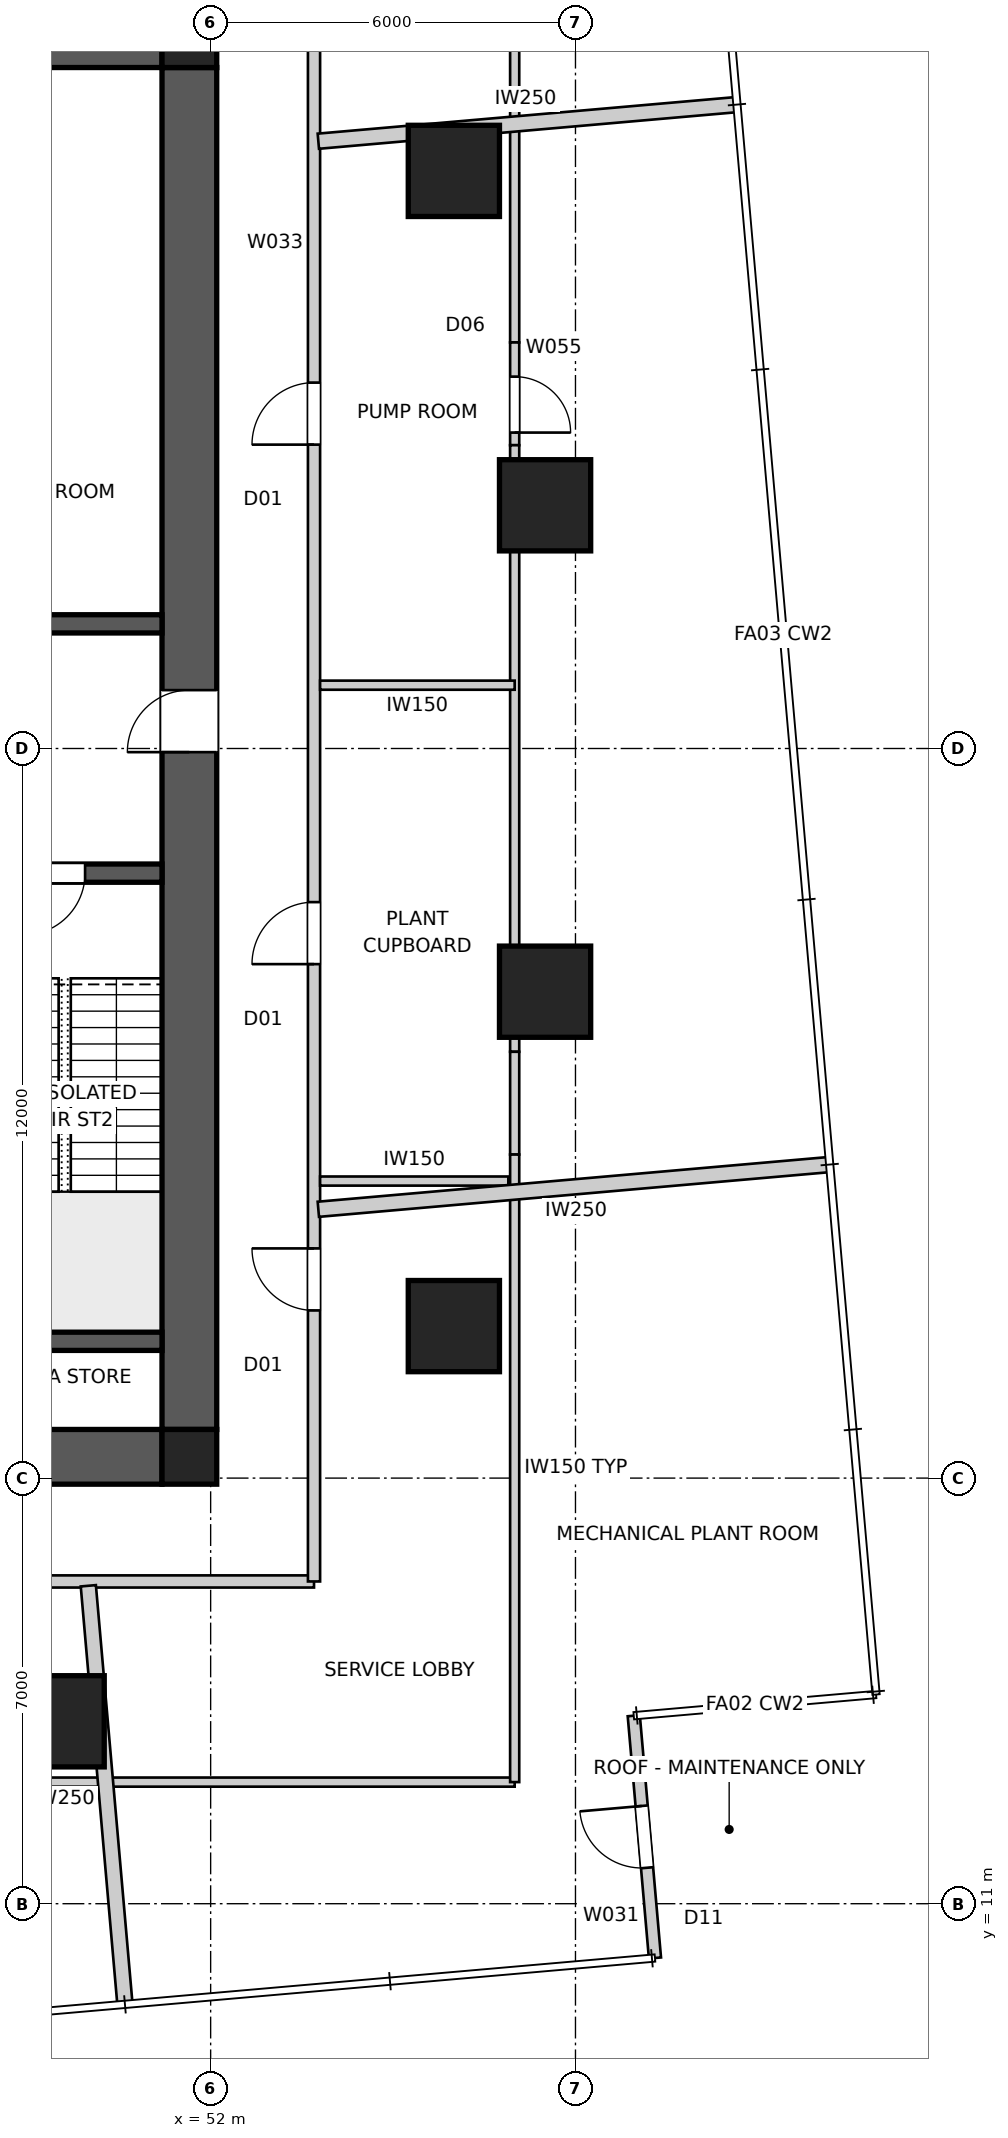
"""IFC4 building model, lengths in metres.
Left out: names, types, materials, properties, quantities, classifications, styles, units other than length and angle.
Written with IfcOpenShell. Run it as: python <this file> out.ifc"""

import sys

from ifc_helpers import new_model, si_unit, direction, frame, frame_2d, origin, origin_2d, place, context, subcontext, project, spatial, polyline, rectangle, outline, extrude, element, fill, save


model = new_model("IFC4")
c1 = context("Model", 3, precision=1e-05, world=origin(), true_north=direction((0.0, 1.0)))
c2 = subcontext(c1, "Body", "Model", "MODEL_VIEW")
j1 = project(units=[si_unit("LENGTHUNIT", "METRE"), si_unit("PLANEANGLEUNIT", "RADIAN")], contexts=[c1])
p1 = place(None, origin())
s1 = spatial("IfcSite", under=j1, at=p1, CompositionType="ELEMENT")
p2 = place(p1, origin())
s2 = spatial("IfcBuilding", under=s1, at=p2, CompositionType="ELEMENT")
p3 = place(p2, frame((0.0, 0.0, 42.2)))
s3 = spatial("IfcBuildingStorey", under=s2, at=p3, CompositionType="ELEMENT", Elevation=42.2)
for number, where, z_axis, x_axis in (
    (1, (28.8, 41.65, 0.0), (0.0, 0.0, 1.0), (1.0, 0.0, 0.0)),
    (2, (51.2, 18.35, 0.0), (0.0, 0.0, 1.0), (-1.0, 0.0, 0.0)),
):
    element("IfcWall", number, at=place(p3, frame(where, z_axis=z_axis, x_axis=x_axis)), inside=s3, PredefinedType="SHEAR", context=c2, shape_type="SweptSolid", body=[
        extrude(outline(polyline([(0.0, -0.45), (22.4, -0.45), (22.4, -0.025), (22.85, -0.025), (22.85, 0.025), (22.4, 0.025), (22.4, 0.45), (0.0, 0.45), (0.0, 0.025), (-0.45, 0.025), (-0.45, -0.025), (0.0, -0.025), (0.0, -0.45)])), origin(), (0.0, 0.0, 1.0), 5.0),
    ])
p4 = place(p3, frame((51.65, 18.8, 0.0), z_axis=(0.0, 0.0, 1.0), x_axis=(0.0, 1.0, 0.0)))
e3 = element("IfcWall", 3, at=p4, inside=s3, PredefinedType="SHEAR", context=c2, shape_type="SweptSolid", body=[
    extrude(outline(polyline([(0.0, -0.45), (22.4, -0.45), (22.4, -0.025), (22.85, -0.025), (22.85, 0.025), (22.4, 0.025), (22.4, 0.45), (0.0, 0.45), (0.0, 0.025), (-0.45, 0.025), (-0.45, -0.025), (0.0, -0.025), (0.0, -0.45)])), origin(), (0.0, 0.0, 1.0), 5.0),
])
p5 = place(p4, frame((11.14, 0.0, 0.0)))
e4 = element("IfcOpeningElement", 4, at=p5, cuts=e3, PredefinedType="OPENING", context=c2, shape_type="SweptSolid", body=[
    extrude(rectangle(XDim=1.02, YDim=2.4, at=frame_2d((0.51, 1.2))), frame((0.0, 0.46, 0.0), z_axis=(0.0, -1.0, 0.0), x_axis=(1.0, 0.0, 0.0)), (0.0, 0.0, 1.0), 0.92),
])
p6 = place(p3, frame((28.8, 32.05, 0.0), z_axis=(0.0, 0.0, 1.0), x_axis=(1.0, 0.0, 0.0)))
e5 = element("IfcWall", 5, at=p6, inside=s3, PredefinedType="SHEAR", context=c2, shape_type="SweptSolid", body=[
    extrude(rectangle(XDim=22.4, YDim=0.3, at=frame_2d((11.2, 0.0))), origin(), (0.0, 0.0, 1.0), 5.0),
])
p7 = place(p6, frame((19.04, 0.0, 0.0)))
e6 = element("IfcOpeningElement", 6, at=p7, cuts=e5, PredefinedType="OPENING", context=c2, shape_type="SweptSolid", body=[
    extrude(rectangle(XDim=0.92, YDim=2.1, at=frame_2d((0.46, 1.05))), frame((0.0, 0.16, 0.0), z_axis=(0.0, -1.0, 0.0), x_axis=(1.0, 0.0, 0.0)), (0.0, 0.0, 1.0), 0.32),
])
p8 = place(p6, frame((1.265, 0.0, 0.0)))
e7 = element("IfcOpeningElement", 7, at=p8, cuts=e5, PredefinedType="OPENING", context=c2, shape_type="SweptSolid", body=[
    extrude(rectangle(XDim=1.02, YDim=2.1, at=frame_2d((0.51, 1.05))), frame((0.0, 0.16, 0.0), z_axis=(0.0, -1.0, 0.0), x_axis=(1.0, 0.0, 0.0)), (0.0, 0.0, 1.0), 0.32),
])
p9 = place(p6, frame((4.015, 0.0, 0.0)))
e8 = element("IfcOpeningElement", 8, at=p9, cuts=e5, PredefinedType="OPENING", context=c2, shape_type="SweptSolid", body=[
    extrude(rectangle(XDim=0.92, YDim=2.1, at=frame_2d((0.46, 1.05))), frame((0.0, 0.16, 0.0), z_axis=(0.0, -1.0, 0.0), x_axis=(1.0, 0.0, 0.0)), (0.0, 0.0, 1.0), 0.32),
])
p10 = place(p6, frame((6.45, 0.0, 0.0)))
e9 = element("IfcOpeningElement", 9, at=p10, cuts=e5, PredefinedType="OPENING", context=c2, shape_type="SweptSolid", body=[
    extrude(rectangle(XDim=1.1, YDim=2.1, at=frame_2d((0.55, 1.05))), frame((0.0, 0.16, 0.0), z_axis=(0.0, -1.0, 0.0), x_axis=(1.0, 0.0, 0.0)), (0.0, 0.0, 1.0), 0.32),
])
p11 = place(p6, frame((9.25, 0.0, 0.0)))
e10 = element("IfcOpeningElement", 10, at=p11, cuts=e5, PredefinedType="OPENING", context=c2, shape_type="SweptSolid", body=[
    extrude(rectangle(XDim=1.1, YDim=2.1, at=frame_2d((0.55, 1.05))), frame((0.0, 0.16, 0.0), z_axis=(0.0, -1.0, 0.0), x_axis=(1.0, 0.0, 0.0)), (0.0, 0.0, 1.0), 0.32),
])
p12 = place(p6, frame((14.85, 0.0, 0.0)))
e11 = element("IfcOpeningElement", 11, at=p12, cuts=e5, PredefinedType="OPENING", context=c2, shape_type="SweptSolid", body=[
    extrude(rectangle(XDim=1.1, YDim=2.1, at=frame_2d((0.55, 1.05))), frame((0.0, 0.16, 0.0), z_axis=(0.0, -1.0, 0.0), x_axis=(1.0, 0.0, 0.0)), (0.0, 0.0, 1.0), 0.32),
])
p13 = place(p3, frame((51.2, 27.95, 0.0), z_axis=(0.0, 0.0, 1.0), x_axis=(-1.0, 0.0, 0.0)))
e12 = element("IfcWall", 12, at=p13, inside=s3, PredefinedType="SHEAR", context=c2, shape_type="SweptSolid", body=[
    extrude(rectangle(XDim=22.4, YDim=0.3, at=frame_2d((11.2, 0.0))), origin(), (0.0, 0.0, 1.0), 5.0),
])
p14 = place(p13, frame((19.04, 0.0, 0.0)))
e13 = element("IfcOpeningElement", 13, at=p14, cuts=e12, PredefinedType="OPENING", context=c2, shape_type="SweptSolid", body=[
    extrude(rectangle(XDim=0.92, YDim=2.1, at=frame_2d((0.46, 1.05))), frame((0.0, 0.16, 0.0), z_axis=(0.0, -1.0, 0.0), x_axis=(1.0, 0.0, 0.0)), (0.0, 0.0, 1.0), 0.32),
])
p15 = place(p13, frame((1.265, 0.0, 0.0)))
e14 = element("IfcOpeningElement", 14, at=p15, cuts=e12, PredefinedType="OPENING", context=c2, shape_type="SweptSolid", body=[
    extrude(rectangle(XDim=1.02, YDim=2.1, at=frame_2d((0.51, 1.05))), frame((0.0, 0.16, 0.0), z_axis=(0.0, -1.0, 0.0), x_axis=(1.0, 0.0, 0.0)), (0.0, 0.0, 1.0), 0.32),
])
p16 = place(p13, frame((4.015, 0.0, 0.0)))
e15 = element("IfcOpeningElement", 15, at=p16, cuts=e12, PredefinedType="OPENING", context=c2, shape_type="SweptSolid", body=[
    extrude(rectangle(XDim=0.92, YDim=2.1, at=frame_2d((0.46, 1.05))), frame((0.0, 0.16, 0.0), z_axis=(0.0, -1.0, 0.0), x_axis=(1.0, 0.0, 0.0)), (0.0, 0.0, 1.0), 0.32),
])
p17 = place(p13, frame((14.85, 0.0, 0.0)))
e16 = element("IfcOpeningElement", 16, at=p17, cuts=e12, PredefinedType="OPENING", context=c2, shape_type="SweptSolid", body=[
    extrude(rectangle(XDim=1.1, YDim=2.1, at=frame_2d((0.55, 1.05))), frame((0.0, 0.16, 0.0), z_axis=(0.0, -1.0, 0.0), x_axis=(1.0, 0.0, 0.0)), (0.0, 0.0, 1.0), 0.32),
])
p18 = place(p3, frame((51.2, 20.25, 0.0), z_axis=(0.0, 0.0, 1.0), x_axis=(-1.0, 0.0, 0.0)))
e17 = element("IfcWall", 17, at=p18, inside=s3, PredefinedType="SHEAR", context=c2, shape_type="SweptSolid", body=[
    extrude(rectangle(XDim=3.5, YDim=0.3, at=frame_2d((1.75, 0.0))), origin(), (0.0, 0.0, 1.0), 5.0),
])
for number, where, z_axis, x_axis in (
    (18, (51.65, 18.35, 0.0), (0.0, 0.0, 1.0), (1.0, 0.0, 0.0)),
    (19, (51.65, 41.65, 0.0), (0.0, 0.0, 1.0), (1.0, 0.0, 0.0)),
):
    element("IfcColumn", number, at=place(p3, frame(where, z_axis=z_axis, x_axis=x_axis)), inside=s3, PredefinedType="COLUMN", context=c2, shape_type="SweptSolid", body=[
        extrude(rectangle(XDim=0.9, YDim=0.9, at=origin_2d()), origin(), (0.0, 0.0, 1.0), 5.0),
    ])
for number, where, z_axis, x_axis in (
    (20, (57.5, 26.0, 0.0), (0.0, 0.0, 1.0), (1.0, 0.0, 0.0)),
    (21, (57.5, 34.0, 0.0), (0.0, 0.0, 1.0), (1.0, 0.0, 0.0)),
    (22, (56.0, 39.5, 0.0), (0.0, 0.0, 1.0), (1.0, 0.0, 0.0)),
    (23, (49.5, 14.0, 0.0), (0.0, 0.0, 1.0), (1.0, 0.0, 0.0)),
    (24, (56.0, 20.5, 0.0), (0.0, 0.0, 1.0), (1.0, 0.0, 0.0)),
):
    element("IfcColumn", number, at=place(p3, frame(where, z_axis=z_axis, x_axis=x_axis)), inside=s3, PredefinedType="COLUMN", context=c2, shape_type="SweptSolid", body=[
        extrude(rectangle(XDim=1.5, YDim=1.5, at=origin_2d()), origin(), (0.0, 0.0, 1.0), 5.0),
    ])
p19 = place(p3, frame((59.307, 10.107, 0.0), z_axis=(0.0, 0.0, 1.0), x_axis=(-0.087156350505, 0.99619464492, 0.0)))
e25 = element("IfcWall", 25, at=p19, inside=s3, PredefinedType="SOLIDWALL", context=c2, shape_type="SweptSolid", body=[
    extrude(rectangle(XDim=4.0, YDim=0.2, at=frame_2d((2.0, 0.0))), origin(), (0.0, 0.0, 1.0), 4.85),
])
p20 = place(p19, frame((1.49, 0.0, 0.0)))
e26 = element("IfcOpeningElement", 26, at=p20, cuts=e25, PredefinedType="OPENING", context=c2, shape_type="SweptSolid", body=[
    extrude(rectangle(XDim=1.02, YDim=2.1, at=frame_2d((0.51, 1.05))), frame((0.0, 0.11, 0.0), z_axis=(0.0, -1.0, 0.0), x_axis=(1.0, 0.0, 0.0)), (0.0, 0.0, 1.0), 0.22),
])
p21 = place(p3, frame((26.3, 16.3, 0.0), z_axis=(0.0, 0.0, 1.0), x_axis=(1.0, 0.0, 0.0)))
e27 = element("IfcWall", 27, at=p21, inside=s3, PredefinedType="PARTITIONING", context=c2, shape_type="SweptSolid", body=[
    extrude(rectangle(XDim=27.4, YDim=0.2, at=frame_2d((13.7, 0.0))), origin(), (0.0, 0.0, 1.0), 4.85),
])
p22 = place(p21, frame((18.698, 0.0, 0.0)))
e28 = element("IfcOpeningElement", 28, at=p22, cuts=e27, PredefinedType="OPENING", context=c2, shape_type="SweptSolid", body=[
    extrude(rectangle(XDim=1.02, YDim=2.34, at=frame_2d((0.51, 1.17))), frame((0.0, 0.11, 0.0), z_axis=(0.0, -1.0, 0.0), x_axis=(1.0, 0.0, 0.0)), (0.0, 0.0, 1.0), 0.22),
])
p23 = place(p21, frame((10.153, 0.0, 0.0)))
e29 = element("IfcOpeningElement", 29, at=p23, cuts=e27, PredefinedType="OPENING", context=c2, shape_type="SweptSolid", body=[
    extrude(rectangle(XDim=1.02, YDim=2.34, at=frame_2d((0.51, 1.17))), frame((0.0, 0.11, 0.0), z_axis=(0.0, -1.0, 0.0), x_axis=(1.0, 0.0, 0.0)), (0.0, 0.0, 1.0), 0.22),
])
p24 = place(p21, frame((4.458, 0.0, 0.0)))
e30 = element("IfcOpeningElement", 30, at=p24, cuts=e27, PredefinedType="OPENING", context=c2, shape_type="SweptSolid", body=[
    extrude(rectangle(XDim=1.02, YDim=2.34, at=frame_2d((0.51, 1.17))), frame((0.0, 0.11, 0.0), z_axis=(0.0, -1.0, 0.0), x_axis=(1.0, 0.0, 0.0)), (0.0, 0.0, 1.0), 0.22),
])
p25 = place(p3, frame((53.7, 16.3, 0.0), z_axis=(0.0, 0.0, 1.0), x_axis=(0.0, 1.0, 0.0)))
e31 = element("IfcWall", 31, at=p25, inside=s3, PredefinedType="PARTITIONING", context=c2, shape_type="SweptSolid", body=[
    extrude(rectangle(XDim=27.4, YDim=0.2, at=frame_2d((13.7, 0.0))), origin(), (0.0, 0.0, 1.0), 4.85),
])
p26 = place(p25, frame((18.698, 0.0, 0.0)))
e32 = element("IfcOpeningElement", 32, at=p26, cuts=e31, PredefinedType="OPENING", context=c2, shape_type="SweptSolid", body=[
    extrude(rectangle(XDim=1.02, YDim=2.34, at=frame_2d((0.51, 1.17))), frame((0.0, 0.11, 0.0), z_axis=(0.0, -1.0, 0.0), x_axis=(1.0, 0.0, 0.0)), (0.0, 0.0, 1.0), 0.22),
])
p27 = place(p25, frame((10.153, 0.0, 0.0)))
e33 = element("IfcOpeningElement", 33, at=p27, cuts=e31, PredefinedType="OPENING", context=c2, shape_type="SweptSolid", body=[
    extrude(rectangle(XDim=1.02, YDim=2.34, at=frame_2d((0.51, 1.17))), frame((0.0, 0.11, 0.0), z_axis=(0.0, -1.0, 0.0), x_axis=(1.0, 0.0, 0.0)), (0.0, 0.0, 1.0), 0.22),
])
p28 = place(p25, frame((4.458, 0.0, 0.0)))
e34 = element("IfcOpeningElement", 34, at=p28, cuts=e31, PredefinedType="OPENING", context=c2, shape_type="SweptSolid", body=[
    extrude(rectangle(XDim=1.02, YDim=2.34, at=frame_2d((0.51, 1.17))), frame((0.0, 0.11, 0.0), z_axis=(0.0, -1.0, 0.0), x_axis=(1.0, 0.0, 0.0)), (0.0, 0.0, 1.0), 0.22),
])
p29 = place(p3, frame((50.591, 9.344, 0.0), z_axis=(0.0, 0.0, 1.0), x_axis=(-0.087152488477, 0.996194982798, 0.0)))
e35 = element("IfcWall", 35, at=p29, inside=s3, PredefinedType="PARTITIONING", context=c2, shape_type="SweptSolid", body=[
    extrude(rectangle(XDim=6.911, YDim=0.25, at=frame_2d((3.456, 0.0))), origin(), (0.0, 0.0, 1.0), 4.85),
])
p30 = place(p3, frame((62.181, 23.157, 0.0), z_axis=(0.0, 0.0, 1.0), x_axis=(-0.996194000005, -0.087163721544, 0.0)))
e36 = element("IfcWall", 36, at=p30, inside=s3, PredefinedType="PARTITIONING", context=c2, shape_type="SweptSolid", body=[
    extrude(rectangle(XDim=8.442, YDim=0.25, at=frame_2d((4.221, 0.0))), origin(), (0.0, 0.0, 1.0), 4.85),
])
p31 = place(p3, frame((60.656, 40.591, 0.0), z_axis=(0.0, 0.0, 1.0), x_axis=(-0.996194982798, -0.087152488477, 0.0)))
e37 = element("IfcWall", 37, at=p31, inside=s3, PredefinedType="PARTITIONING", context=c2, shape_type="SweptSolid", body=[
    extrude(rectangle(XDim=6.911, YDim=0.25, at=frame_2d((3.456, 0.0))), origin(), (0.0, 0.0, 1.0), 4.85),
])
p32 = place(p3, frame((57.0, 13.0, 0.0), z_axis=(0.0, 0.0, 1.0), x_axis=(-1.0, 0.0, 0.0)))
e38 = element("IfcWall", 38, at=p32, inside=s3, PredefinedType="SOLIDWALL", context=c2, shape_type="SweptSolid", body=[
    extrude(rectangle(XDim=10.322, YDim=0.15, at=frame_2d((5.161, 0.0))), origin(), (0.0, 0.0, 1.0), 4.85),
])
p33 = place(p3, frame((53.8, 22.885, 0.0), z_axis=(0.0, 0.0, 1.0), x_axis=(1.0, 0.0, 0.0)))
e39 = element("IfcWall", 39, at=p33, inside=s3, PredefinedType="SOLIDWALL", context=c2, shape_type="SweptSolid", body=[
    extrude(rectangle(XDim=3.096, YDim=0.15, at=frame_2d((1.548, 0.0))), origin(), (0.0, 0.0, 1.0), 4.85),
])
p34 = place(p3, frame((57.0, 47.0, 0.0), z_axis=(0.0, 0.0, 1.0), x_axis=(0.0, -1.0, 0.0)))
e40 = element("IfcWall", 40, at=p34, inside=s3, PredefinedType="SOLIDWALL", context=c2, shape_type="SweptSolid", body=[
    extrude(rectangle(XDim=10.322, YDim=0.15, at=frame_2d((5.161, 0.0))), origin(), (0.0, 0.0, 1.0), 4.85),
])
p35 = place(p3, frame((57.0, 36.678, 0.0), z_axis=(0.0, 0.0, 1.0), x_axis=(0.0, -1.0, 0.0)))
e41 = element("IfcWall", 41, at=p35, inside=s3, PredefinedType="SOLIDWALL", context=c2, shape_type="SweptSolid", body=[
    extrude(rectangle(XDim=1.69, YDim=0.15, at=frame_2d((0.845, 0.0))), origin(), (0.0, 0.0, 1.0), 3.85),
])
p36 = place(p35, frame((0.562, 0.0, 0.0)))
e42 = element("IfcOpeningElement", 42, at=p36, cuts=e41, PredefinedType="OPENING", context=c2, shape_type="SweptSolid", body=[
    extrude(rectangle(XDim=0.92, YDim=2.1, at=frame_2d((0.46, 1.05))), frame((0.0, 0.085, 0.0), z_axis=(0.0, -1.0, 0.0), x_axis=(1.0, 0.0, 0.0)), (0.0, 0.0, 1.0), 0.17),
])
p37 = place(p3, frame((57.0, 34.988, 0.0), z_axis=(0.0, 0.0, 1.0), x_axis=(0.0, -1.0, 0.0)))
e43 = element("IfcWall", 43, at=p37, inside=s3, PredefinedType="SOLIDWALL", context=c2, shape_type="SweptSolid", body=[
    extrude(rectangle(XDim=9.977, YDim=0.15, at=frame_2d((4.988, 0.0))), origin(), (0.0, 0.0, 1.0), 4.85),
])
p38 = place(p3, frame((57.0, 25.012, 0.0), z_axis=(0.0, 0.0, 1.0), x_axis=(0.0, -1.0, 0.0)))
e44 = element("IfcWall", 44, at=p38, inside=s3, PredefinedType="SOLIDWALL", context=c2, shape_type="SweptSolid", body=[
    extrude(rectangle(XDim=1.69, YDim=0.15, at=frame_2d((0.845, 0.0))), origin(), (0.0, 0.0, 1.0), 3.85),
])
p39 = place(p3, frame((57.0, 23.322, 0.0), z_axis=(0.0, 0.0, 1.0), x_axis=(0.0, -1.0, 0.0)))
e45 = element("IfcWall", 45, at=p39, inside=s3, PredefinedType="SOLIDWALL", context=c2, shape_type="SweptSolid", body=[
    extrude(rectangle(XDim=10.322, YDim=0.15, at=frame_2d((5.161, 0.0))), origin(), (0.0, 0.0, 1.0), 4.85),
])
p40 = place(p3, frame((57.0, 31.041, 0.0), z_axis=(0.0, 0.0, 1.0), x_axis=(-1.0, 0.0, 0.0)))
e46 = element("IfcWall", 46, at=p40, inside=s3, PredefinedType="SOLIDWALL", context=c2, shape_type="SweptSolid", body=[
    extrude(rectangle(XDim=3.2, YDim=0.15, at=frame_2d((1.6, 0.0))), origin(), (0.0, 0.0, 1.0), 4.85),
])
p41 = place(p20, origin())
e47 = element("IfcDoor", 47, at=p41, inside=s3, OperationType="SINGLE_SWING_RIGHT", PredefinedType="DOOR", context=c2, shape_type="SweptSolid", body=[
    extrude(rectangle(XDim=1.02, YDim=2.1, at=frame_2d((0.51, 1.05))), frame((0.0, 0.025, 0.0), z_axis=(0.0, -1.0, 0.0), x_axis=(1.0, 0.0, 0.0)), (0.0, 0.0, 1.0), 0.05),
])
fill(e26, e47)
p42 = place(p15, origin())
e48 = element("IfcDoor", 48, at=p42, inside=s3, OperationType="SINGLE_SWING_RIGHT", PredefinedType="DOOR", context=c2, shape_type="SweptSolid", body=[
    extrude(rectangle(XDim=1.02, YDim=2.1, at=frame_2d((0.51, 1.05))), frame((0.0, 0.025, 0.0), z_axis=(0.0, -1.0, 0.0), x_axis=(1.0, 0.0, 0.0)), (0.0, 0.0, 1.0), 0.05),
])
fill(e14, e48)
p43 = place(p26, origin())
e49 = element("IfcDoor", 49, at=p43, inside=s3, OperationType="SINGLE_SWING_LEFT", PredefinedType="DOOR", context=c2, shape_type="SweptSolid", body=[
    extrude(rectangle(XDim=1.02, YDim=2.34, at=frame_2d((0.51, 1.17))), frame((0.0, 0.025, 0.0), z_axis=(0.0, -1.0, 0.0), x_axis=(1.0, 0.0, 0.0)), (0.0, 0.0, 1.0), 0.05),
])
fill(e32, e49)
p44 = place(p27, origin())
e50 = element("IfcDoor", 50, at=p44, inside=s3, OperationType="SINGLE_SWING_LEFT", PredefinedType="DOOR", context=c2, shape_type="SweptSolid", body=[
    extrude(rectangle(XDim=1.02, YDim=2.34, at=frame_2d((0.51, 1.17))), frame((0.0, 0.025, 0.0), z_axis=(0.0, -1.0, 0.0), x_axis=(1.0, 0.0, 0.0)), (0.0, 0.0, 1.0), 0.05),
])
fill(e33, e50)
p45 = place(p28, origin())
e51 = element("IfcDoor", 51, at=p45, inside=s3, OperationType="SINGLE_SWING_RIGHT", PredefinedType="DOOR", context=c2, shape_type="SweptSolid", body=[
    extrude(rectangle(XDim=1.02, YDim=2.34, at=frame_2d((0.51, 1.17))), frame((0.0, 0.025, 0.0), z_axis=(0.0, -1.0, 0.0), x_axis=(1.0, 0.0, 0.0)), (0.0, 0.0, 1.0), 0.05),
])
fill(e34, e51)
p46 = place(p36, origin())
e52 = element("IfcDoor", 52, at=p46, inside=s3, OperationType="SINGLE_SWING_RIGHT", PredefinedType="DOOR", context=c2, shape_type="SweptSolid", body=[
    extrude(rectangle(XDim=0.92, YDim=2.1, at=frame_2d((0.46, 1.05))), frame((0.0, 0.025, 0.0), z_axis=(0.0, -1.0, 0.0), x_axis=(1.0, 0.0, 0.0)), (0.0, 0.0, 1.0), 0.05),
])
fill(e42, e52)
p47 = place(p5, origin())
e53 = element("IfcDoor", 53, at=p47, inside=s3, OperationType="SINGLE_SWING_LEFT", PredefinedType="DOOR", context=c2, shape_type="SweptSolid", body=[
    extrude(rectangle(XDim=1.02, YDim=2.4, at=frame_2d((0.51, 1.2))), frame((0.0, 0.025, 0.0), z_axis=(0.0, -1.0, 0.0), x_axis=(1.0, 0.0, 0.0)), (0.0, 0.0, 1.0), 0.05),
])
fill(e4, e53)
save(model, sys.argv[1])
